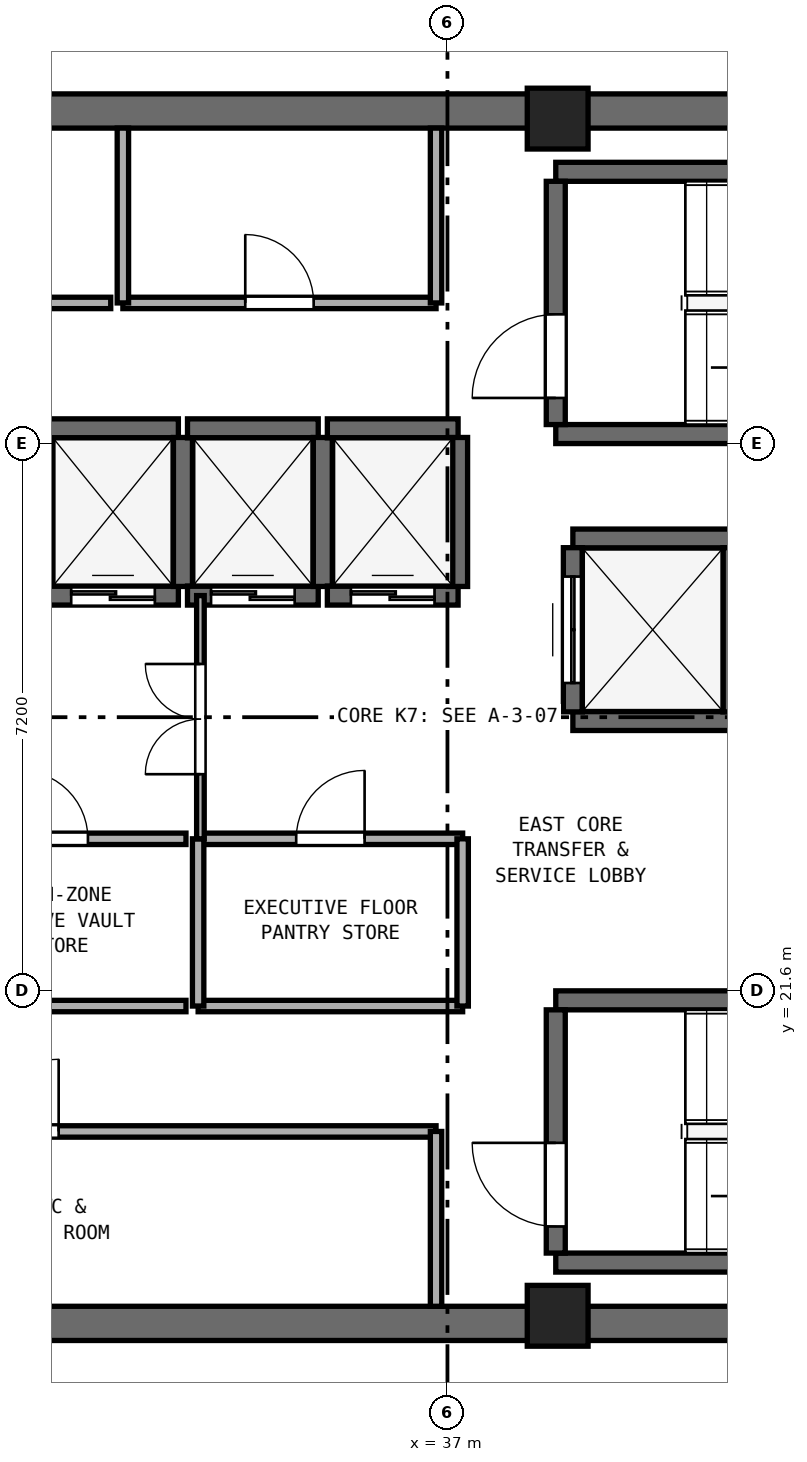
"""IFC4 building model, lengths in metres.
Left out: names, types, materials, properties, quantities, classifications, styles, units other than length and angle.
Written with IfcOpenShell. Run it as: python <this file> out.ifc"""

import sys

from ifc_helpers import new_model, si_unit, direction, frame, frame_2d, origin, origin_2d, place, context, subcontext, project, spatial, rectangle, extrude, element, fill, save


model = new_model("IFC4")
c1 = context("Model", 3, precision=1e-05, world=origin(), true_north=direction((0.0, 1.0)))
c2 = subcontext(c1, "Body", "Model", "MODEL_VIEW")
j1 = project(units=[si_unit("LENGTHUNIT", "METRE"), si_unit("PLANEANGLEUNIT", "RADIAN")], contexts=[c1])
p1 = place(None, origin())
s1 = spatial("IfcSite", under=j1, at=p1, CompositionType="ELEMENT")
p2 = place(p1, origin())
s2 = spatial("IfcBuilding", under=s1, at=p2, CompositionType="ELEMENT")
p3 = place(p2, frame((0.0, 0.0, 266.8)))
s3 = spatial("IfcBuildingStorey", under=s2, at=p3, CompositionType="ELEMENT", Elevation=266.8)
for number, where, z_axis, x_axis in (
    (1, (25.4, 17.225, 0.0), (0.0, 0.0, 1.0), (1.0, 0.0, 0.0)),
    (2, (25.4, 33.175, 0.0), (0.0, 0.0, 1.0), (1.0, 0.0, 0.0)),
):
    element("IfcWall", number, at=place(p3, frame(where, z_axis=z_axis, x_axis=x_axis)), inside=s3, PredefinedType="SHEAR", context=c2, shape_type="SweptSolid", body=[
        extrude(rectangle(XDim=23.2, YDim=0.45, at=frame_2d((11.6, 0.0))), origin(), (0.0, 0.0, 1.0), 3.51),
    ])
for number, where, z_axis, x_axis in (
    (3, (38.45, 17.325, 0.0), (0.0, 0.0, 1.0), (1.0, 0.0, 0.0)),
    (4, (38.45, 33.075, 0.0), (0.0, 0.0, 1.0), (1.0, 0.0, 0.0)),
):
    element("IfcColumn", number, at=place(p3, frame(where, z_axis=z_axis, x_axis=x_axis)), inside=s3, PredefinedType="PILASTER", context=c2, shape_type="SweptSolid", body=[
        extrude(rectangle(XDim=0.8, YDim=0.8, at=origin_2d()), origin(), (0.0, 0.0, 1.0), 3.8),
    ])
for number, where, z_axis, x_axis in (
    (5, (38.425, 28.925, 0.0), (0.0, 0.0, 1.0), (1.0, 0.0, 0.0)),
    (6, (38.425, 32.375, 0.0), (0.0, 0.0, 1.0), (1.0, 0.0, 0.0)),
):
    element("IfcWall", number, at=place(p3, frame(where, z_axis=z_axis, x_axis=x_axis)), inside=s3, PredefinedType="SHEAR", context=c2, shape_type="SweptSolid", body=[
        extrude(rectangle(XDim=7.3, YDim=0.25, at=frame_2d((3.65, 0.0))), origin(), (0.0, 0.0, 1.0), 3.51),
    ])
p4 = place(p3, frame((38.425, 29.05, 0.0), z_axis=(0.0, 0.0, 1.0), x_axis=(0.0, 1.0, 0.0)))
e7 = element("IfcWall", 7, at=p4, inside=s3, PredefinedType="SHEAR", context=c2, shape_type="SweptSolid", body=[
    extrude(rectangle(XDim=3.2, YDim=0.25, at=frame_2d((1.6, 0.0))), origin(), (0.0, 0.0, 1.0), 3.51),
])
p5 = place(p4, frame((0.35, 0.0, 0.0)))
e8 = element("IfcOpeningElement", 8, at=p5, cuts=e7, PredefinedType="OPENING", context=c2, shape_type="SweptSolid", body=[
    extrude(rectangle(XDim=1.1, YDim=2.15, at=frame_2d((0.55, 1.075))), frame((0.0, 0.135, 0.0), z_axis=(0.0, -1.0, 0.0), x_axis=(1.0, 0.0, 0.0)), (0.0, 0.0, 1.0), 0.27),
])
for number, where, z_axis, x_axis in (
    (9, (38.425, 18.025, 0.0), (0.0, 0.0, 1.0), (1.0, 0.0, 0.0)),
    (10, (38.425, 21.475, 0.0), (0.0, 0.0, 1.0), (1.0, 0.0, 0.0)),
):
    element("IfcWall", number, at=place(p3, frame(where, z_axis=z_axis, x_axis=x_axis)), inside=s3, PredefinedType="SHEAR", context=c2, shape_type="SweptSolid", body=[
        extrude(rectangle(XDim=7.3, YDim=0.25, at=frame_2d((3.65, 0.0))), origin(), (0.0, 0.0, 1.0), 3.51),
    ])
p6 = place(p3, frame((38.425, 18.15, 0.0), z_axis=(0.0, 0.0, 1.0), x_axis=(0.0, 1.0, 0.0)))
e11 = element("IfcWall", 11, at=p6, inside=s3, PredefinedType="SHEAR", context=c2, shape_type="SweptSolid", body=[
    extrude(rectangle(XDim=3.2, YDim=0.25, at=frame_2d((1.6, 0.0))), origin(), (0.0, 0.0, 1.0), 3.51),
])
p7 = place(p6, frame((0.35, 0.0, 0.0)))
e12 = element("IfcOpeningElement", 12, at=p7, cuts=e11, PredefinedType="OPENING", context=c2, shape_type="SweptSolid", body=[
    extrude(rectangle(XDim=1.1, YDim=2.15, at=frame_2d((0.55, 1.075))), frame((0.0, 0.135, 0.0), z_axis=(0.0, -1.0, 0.0), x_axis=(1.0, 0.0, 0.0)), (0.0, 0.0, 1.0), 0.27),
])
p8 = place(p3, frame((31.74, 26.8, 0.0), z_axis=(0.0, 0.0, 1.0), x_axis=(1.0, 0.0, 0.0)))
e13 = element("IfcWall", 13, at=p8, inside=s3, PredefinedType="SHEAR", context=c2, shape_type="SweptSolid", body=[
    extrude(rectangle(XDim=1.72, YDim=0.25, at=frame_2d((0.86, 0.0))), origin(), (0.0, 0.0, 1.0), 3.51),
])
p9 = place(p8, frame((0.31, 0.0, 0.0)))
e14 = element("IfcOpeningElement", 14, at=p9, cuts=e13, PredefinedType="OPENING", context=c2, shape_type="SweptSolid", body=[
    extrude(rectangle(XDim=1.1, YDim=2.15, at=frame_2d((0.55, 1.075))), frame((0.0, 0.135, 0.0), z_axis=(0.0, -1.0, 0.0), x_axis=(1.0, 0.0, 0.0)), (0.0, 0.0, 1.0), 0.27),
])
p10 = place(p3, frame((31.74, 29.0, 0.0), z_axis=(0.0, 0.0, 1.0), x_axis=(1.0, 0.0, 0.0)))
e15 = element("IfcWall", 15, at=p10, inside=s3, PredefinedType="SHEAR", context=c2, shape_type="SweptSolid", body=[
    extrude(rectangle(XDim=1.72, YDim=0.25, at=frame_2d((0.86, 0.0))), origin(), (0.0, 0.0, 1.0), 3.51),
])
p11 = place(p3, frame((33.52, 26.92, 0.0), z_axis=(0.0, 0.0, 1.0), x_axis=(0.0, 1.0, 0.0)))
e16 = element("IfcWall", 16, at=p11, inside=s3, PredefinedType="SHEAR", context=c2, shape_type="SweptSolid", body=[
    extrude(rectangle(XDim=1.96, YDim=0.25, at=frame_2d((0.98, 0.0))), origin(), (0.0, 0.0, 1.0), 3.51),
])
p12 = place(p3, frame((33.58, 26.8, 0.0), z_axis=(0.0, 0.0, 1.0), x_axis=(1.0, 0.0, 0.0)))
e17 = element("IfcWall", 17, at=p12, inside=s3, PredefinedType="SHEAR", context=c2, shape_type="SweptSolid", body=[
    extrude(rectangle(XDim=1.72, YDim=0.25, at=frame_2d((0.86, 0.0))), origin(), (0.0, 0.0, 1.0), 3.51),
])
p13 = place(p12, frame((0.31, 0.0, 0.0)))
e18 = element("IfcOpeningElement", 18, at=p13, cuts=e17, PredefinedType="OPENING", context=c2, shape_type="SweptSolid", body=[
    extrude(rectangle(XDim=1.1, YDim=2.15, at=frame_2d((0.55, 1.075))), frame((0.0, 0.135, 0.0), z_axis=(0.0, -1.0, 0.0), x_axis=(1.0, 0.0, 0.0)), (0.0, 0.0, 1.0), 0.27),
])
p14 = place(p3, frame((33.58, 29.0, 0.0), z_axis=(0.0, 0.0, 1.0), x_axis=(1.0, 0.0, 0.0)))
e19 = element("IfcWall", 19, at=p14, inside=s3, PredefinedType="SHEAR", context=c2, shape_type="SweptSolid", body=[
    extrude(rectangle(XDim=1.72, YDim=0.25, at=frame_2d((0.86, 0.0))), origin(), (0.0, 0.0, 1.0), 3.51),
])
p15 = place(p3, frame((35.36, 26.92, 0.0), z_axis=(0.0, 0.0, 1.0), x_axis=(0.0, 1.0, 0.0)))
e20 = element("IfcWall", 20, at=p15, inside=s3, PredefinedType="SHEAR", context=c2, shape_type="SweptSolid", body=[
    extrude(rectangle(XDim=1.96, YDim=0.25, at=frame_2d((0.98, 0.0))), origin(), (0.0, 0.0, 1.0), 3.51),
])
p16 = place(p3, frame((35.42, 26.8, 0.0), z_axis=(0.0, 0.0, 1.0), x_axis=(1.0, 0.0, 0.0)))
e21 = element("IfcWall", 21, at=p16, inside=s3, PredefinedType="SHEAR", context=c2, shape_type="SweptSolid", body=[
    extrude(rectangle(XDim=1.72, YDim=0.25, at=frame_2d((0.86, 0.0))), origin(), (0.0, 0.0, 1.0), 3.51),
])
p17 = place(p16, frame((0.31, 0.0, 0.0)))
e22 = element("IfcOpeningElement", 22, at=p17, cuts=e21, PredefinedType="OPENING", context=c2, shape_type="SweptSolid", body=[
    extrude(rectangle(XDim=1.1, YDim=2.15, at=frame_2d((0.55, 1.075))), frame((0.0, 0.135, 0.0), z_axis=(0.0, -1.0, 0.0), x_axis=(1.0, 0.0, 0.0)), (0.0, 0.0, 1.0), 0.27),
])
p18 = place(p3, frame((35.42, 29.0, 0.0), z_axis=(0.0, 0.0, 1.0), x_axis=(1.0, 0.0, 0.0)))
e23 = element("IfcWall", 23, at=p18, inside=s3, PredefinedType="SHEAR", context=c2, shape_type="SweptSolid", body=[
    extrude(rectangle(XDim=1.72, YDim=0.25, at=frame_2d((0.86, 0.0))), origin(), (0.0, 0.0, 1.0), 3.51),
])
p19 = place(p3, frame((37.14, 26.92, 0.0), z_axis=(0.0, 0.0, 1.0), x_axis=(0.0, 1.0, 0.0)))
e24 = element("IfcWall", 24, at=p19, inside=s3, PredefinedType="SHEAR", context=c2, shape_type="SweptSolid", body=[
    extrude(rectangle(XDim=1.96, YDim=0.25, at=frame_2d((0.98, 0.0))), origin(), (0.0, 0.0, 1.0), 3.51),
])
for number, where, z_axis, x_axis in (
    (25, (38.65, 25.15, 0.0), (0.0, 0.0, 1.0), (1.0, 0.0, 0.0)),
    (26, (38.65, 27.55, 0.0), (0.0, 0.0, 1.0), (1.0, 0.0, 0.0)),
):
    element("IfcWall", number, at=place(p3, frame(where, z_axis=z_axis, x_axis=x_axis)), inside=s3, PredefinedType="SHEAR", context=c2, shape_type="SweptSolid", body=[
        extrude(rectangle(XDim=2.1, YDim=0.25, at=frame_2d((1.05, 0.0))), origin(), (0.0, 0.0, 1.0), 3.51),
    ])
p20 = place(p3, frame((38.65, 25.27, 0.0), z_axis=(0.0, 0.0, 1.0), x_axis=(0.0, 1.0, 0.0)))
e27 = element("IfcWall", 27, at=p20, inside=s3, PredefinedType="SHEAR", context=c2, shape_type="SweptSolid", body=[
    extrude(rectangle(XDim=2.16, YDim=0.25, at=frame_2d((1.08, 0.0))), origin(), (0.0, 0.0, 1.0), 3.51),
])
p21 = place(p20, frame((0.38, 0.0, 0.0)))
e28 = element("IfcOpeningElement", 28, at=p21, cuts=e27, PredefinedType="OPENING", context=c2, shape_type="SweptSolid", body=[
    extrude(rectangle(XDim=1.4, YDim=2.2, at=frame_2d((0.7, 1.1))), frame((0.0, 0.135, 0.0), z_axis=(0.0, -1.0, 0.0), x_axis=(1.0, 0.0, 0.0)), (0.0, 0.0, 1.0), 0.27),
])
p22 = place(p3, frame((40.75, 25.27, 0.0), z_axis=(0.0, 0.0, 1.0), x_axis=(0.0, 1.0, 0.0)))
e29 = element("IfcWall", 29, at=p22, inside=s3, PredefinedType="SHEAR", context=c2, shape_type="SweptSolid", body=[
    extrude(rectangle(XDim=2.16, YDim=0.25, at=frame_2d((1.08, 0.0))), origin(), (0.0, 0.0, 1.0), 3.51),
])
p23 = place(p3, frame((29.33, 30.65, 0.0), z_axis=(0.0, 0.0, 1.0), x_axis=(1.0, 0.0, 0.0)))
e30 = element("IfcWall", 30, at=p23, inside=s3, PredefinedType="PARTITIONING", context=c2, shape_type="SweptSolid", body=[
    extrude(rectangle(XDim=3.24, YDim=0.15, at=frame_2d((1.62, 0.0))), origin(), (0.0, 0.0, 1.0), 3.51),
])
p24 = place(p23, frame((1.145, 0.0, 0.0)))
e31 = element("IfcOpeningElement", 31, at=p24, cuts=e30, PredefinedType="OPENING", context=c2, shape_type="SweptSolid", body=[
    extrude(rectangle(XDim=0.95, YDim=2.1, at=frame_2d((0.475, 1.05))), frame((0.0, 0.085, 0.0), z_axis=(0.0, -1.0, 0.0), x_axis=(1.0, 0.0, 0.0)), (0.0, 0.0, 1.0), 0.17),
])
p25 = place(p3, frame((32.73, 30.65, 0.0), z_axis=(0.0, 0.0, 1.0), x_axis=(1.0, 0.0, 0.0)))
e32 = element("IfcWall", 32, at=p25, inside=s3, PredefinedType="PARTITIONING", context=c2, shape_type="SweptSolid", body=[
    extrude(rectangle(XDim=4.12, YDim=0.15, at=frame_2d((2.06, 0.0))), origin(), (0.0, 0.0, 1.0), 3.51),
])
p26 = place(p25, frame((1.61, 0.0, 0.0)))
e33 = element("IfcOpeningElement", 33, at=p26, cuts=e32, PredefinedType="OPENING", context=c2, shape_type="SweptSolid", body=[
    extrude(rectangle(XDim=0.9, YDim=2.1, at=frame_2d((0.45, 1.05))), frame((0.0, 0.085, 0.0), z_axis=(0.0, -1.0, 0.0), x_axis=(1.0, 0.0, 0.0)), (0.0, 0.0, 1.0), 0.17),
])
for number, where, z_axis, x_axis in (
    (34, (32.73, 30.65, 0.0), (0.0, 0.0, 1.0), (0.0, 1.0, 0.0)),
    (35, (36.85, 30.65, 0.0), (0.0, 0.0, 1.0), (0.0, 1.0, 0.0)),
):
    element("IfcWall", number, at=place(p3, frame(where, z_axis=z_axis, x_axis=x_axis)), inside=s3, PredefinedType="PARTITIONING", context=c2, shape_type="SweptSolid", body=[
        extrude(rectangle(XDim=2.3, YDim=0.15, at=frame_2d((1.15, 0.0))), origin(), (0.0, 0.0, 1.0), 3.51),
    ])
p27 = place(p3, frame((25.97, 19.75, 0.0), z_axis=(0.0, 0.0, 1.0), x_axis=(1.0, 0.0, 0.0)))
e36 = element("IfcWall", 36, at=p27, inside=s3, PredefinedType="PARTITIONING", context=c2, shape_type="SweptSolid", body=[
    extrude(rectangle(XDim=10.88, YDim=0.15, at=frame_2d((5.44, 0.0))), origin(), (0.0, 0.0, 1.0), 3.51),
])
p28 = place(p27, frame((4.965, 0.0, 0.0)))
e37 = element("IfcOpeningElement", 37, at=p28, cuts=e36, PredefinedType="OPENING", context=c2, shape_type="SweptSolid", body=[
    extrude(rectangle(XDim=0.95, YDim=2.1, at=frame_2d((0.475, 1.05))), frame((0.0, 0.085, 0.0), z_axis=(0.0, -1.0, 0.0), x_axis=(1.0, 0.0, 0.0)), (0.0, 0.0, 1.0), 0.17),
])
p29 = place(p3, frame((36.85, 17.45, 0.0), z_axis=(0.0, 0.0, 1.0), x_axis=(0.0, 1.0, 0.0)))
e38 = element("IfcWall", 38, at=p29, inside=s3, PredefinedType="PARTITIONING", context=c2, shape_type="SweptSolid", body=[
    extrude(rectangle(XDim=2.3, YDim=0.15, at=frame_2d((1.15, 0.0))), origin(), (0.0, 0.0, 1.0), 3.51),
])
p30 = place(p3, frame((30.08, 21.4, 0.0), z_axis=(0.0, 0.0, 1.0), x_axis=(1.0, 0.0, 0.0)))
e39 = element("IfcWall", 39, at=p30, inside=s3, PredefinedType="PARTITIONING", context=c2, shape_type="SweptSolid", body=[
    extrude(rectangle(XDim=3.48, YDim=0.15, at=frame_2d((1.74, 0.0))), origin(), (0.0, 0.0, 1.0), 3.51),
])
p31 = place(p3, frame((30.08, 23.6, 0.0), z_axis=(0.0, 0.0, 1.0), x_axis=(1.0, 0.0, 0.0)))
e40 = element("IfcWall", 40, at=p31, inside=s3, PredefinedType="PARTITIONING", context=c2, shape_type="SweptSolid", body=[
    extrude(rectangle(XDim=3.48, YDim=0.15, at=frame_2d((1.74, 0.0))), origin(), (0.0, 0.0, 1.0), 3.51),
])
p32 = place(p31, frame((1.29, 0.0, 0.0)))
e41 = element("IfcOpeningElement", 41, at=p32, cuts=e40, PredefinedType="OPENING", context=c2, shape_type="SweptSolid", body=[
    extrude(rectangle(XDim=0.9, YDim=2.1, at=frame_2d((0.45, 1.05))), frame((0.0, 0.085, 0.0), z_axis=(0.0, -1.0, 0.0), x_axis=(1.0, 0.0, 0.0)), (0.0, 0.0, 1.0), 0.17),
])
p33 = place(p3, frame((33.72, 21.4, 0.0), z_axis=(0.0, 0.0, 1.0), x_axis=(1.0, 0.0, 0.0)))
e42 = element("IfcWall", 42, at=p33, inside=s3, PredefinedType="PARTITIONING", context=c2, shape_type="SweptSolid", body=[
    extrude(rectangle(XDim=3.48, YDim=0.15, at=frame_2d((1.74, 0.0))), origin(), (0.0, 0.0, 1.0), 3.51),
])
p34 = place(p3, frame((33.72, 23.6, 0.0), z_axis=(0.0, 0.0, 1.0), x_axis=(1.0, 0.0, 0.0)))
e43 = element("IfcWall", 43, at=p34, inside=s3, PredefinedType="PARTITIONING", context=c2, shape_type="SweptSolid", body=[
    extrude(rectangle(XDim=3.48, YDim=0.15, at=frame_2d((1.74, 0.0))), origin(), (0.0, 0.0, 1.0), 3.51),
])
p35 = place(p34, frame((1.29, 0.0, 0.0)))
e44 = element("IfcOpeningElement", 44, at=p35, cuts=e43, PredefinedType="OPENING", context=c2, shape_type="SweptSolid", body=[
    extrude(rectangle(XDim=0.9, YDim=2.1, at=frame_2d((0.45, 1.05))), frame((0.0, 0.085, 0.0), z_axis=(0.0, -1.0, 0.0), x_axis=(1.0, 0.0, 0.0)), (0.0, 0.0, 1.0), 0.17),
])
for number, where, z_axis, x_axis in (
    (45, (33.72, 21.4, 0.0), (0.0, 0.0, 1.0), (0.0, 1.0, 0.0)),
    (46, (37.2, 21.4, 0.0), (0.0, 0.0, 1.0), (0.0, 1.0, 0.0)),
):
    element("IfcWall", number, at=place(p3, frame(where, z_axis=z_axis, x_axis=x_axis)), inside=s3, PredefinedType="PARTITIONING", context=c2, shape_type="SweptSolid", body=[
        extrude(rectangle(XDim=2.2, YDim=0.15, at=frame_2d((1.1, 0.0))), origin(), (0.0, 0.0, 1.0), 3.51),
    ])
p36 = place(p3, frame((33.75, 23.6, 0.0), z_axis=(0.0, 0.0, 1.0), x_axis=(0.0, 1.0, 0.0)))
e47 = element("IfcWall", 47, at=p36, inside=s3, PredefinedType="PARTITIONING", context=c2, shape_type="SweptSolid", body=[
    extrude(rectangle(XDim=3.2, YDim=0.1, at=frame_2d((1.6, 0.0))), origin(), (0.0, 0.0, 1.0), 3.51),
])
p37 = place(p36, frame((0.85, 0.0, 0.0)))
e48 = element("IfcOpeningElement", 48, at=p37, cuts=e47, PredefinedType="OPENING", context=c2, shape_type="SweptSolid", body=[
    extrude(rectangle(XDim=1.45, YDim=2.12, at=frame_2d((0.725, 1.06))), frame((0.0, 0.06, 0.0), z_axis=(0.0, -1.0, 0.0), x_axis=(1.0, 0.0, 0.0)), (0.0, 0.0, 1.0), 0.12),
])
p38 = place(p5, origin())
e49 = element("IfcDoor", 49, at=p38, inside=s3, OperationType="SINGLE_SWING_LEFT", PredefinedType="DOOR", context=c2, shape_type="SweptSolid", body=[
    extrude(rectangle(XDim=1.1, YDim=2.15, at=frame_2d((0.55, 1.075))), frame((0.0, 0.025, 0.0), z_axis=(0.0, -1.0, 0.0), x_axis=(1.0, 0.0, 0.0)), (0.0, 0.0, 1.0), 0.05),
])
fill(e8, e49)
p39 = place(p7, origin())
e50 = element("IfcDoor", 50, at=p39, inside=s3, OperationType="SINGLE_SWING_RIGHT", PredefinedType="DOOR", context=c2, shape_type="SweptSolid", body=[
    extrude(rectangle(XDim=1.1, YDim=2.15, at=frame_2d((0.55, 1.075))), frame((0.0, 0.025, 0.0), z_axis=(0.0, -1.0, 0.0), x_axis=(1.0, 0.0, 0.0)), (0.0, 0.0, 1.0), 0.05),
])
fill(e12, e50)
p40 = place(p9, origin())
e51 = element("IfcDoor", 51, at=p40, inside=s3, OperationType="DOUBLE_DOOR_SLIDING", PredefinedType="DOOR", context=c2, shape_type="SweptSolid", body=[
    extrude(rectangle(XDim=1.1, YDim=2.15, at=frame_2d((0.55, 1.075))), frame((0.0, 0.025, 0.0), z_axis=(0.0, -1.0, 0.0), x_axis=(1.0, 0.0, 0.0)), (0.0, 0.0, 1.0), 0.05),
])
fill(e14, e51)
p41 = place(p13, origin())
e52 = element("IfcDoor", 52, at=p41, inside=s3, OperationType="DOUBLE_DOOR_SLIDING", PredefinedType="DOOR", context=c2, shape_type="SweptSolid", body=[
    extrude(rectangle(XDim=1.1, YDim=2.15, at=frame_2d((0.55, 1.075))), frame((0.0, 0.025, 0.0), z_axis=(0.0, -1.0, 0.0), x_axis=(1.0, 0.0, 0.0)), (0.0, 0.0, 1.0), 0.05),
])
fill(e18, e52)
p42 = place(p17, origin())
e53 = element("IfcDoor", 53, at=p42, inside=s3, OperationType="DOUBLE_DOOR_SLIDING", PredefinedType="DOOR", context=c2, shape_type="SweptSolid", body=[
    extrude(rectangle(XDim=1.1, YDim=2.15, at=frame_2d((0.55, 1.075))), frame((0.0, 0.025, 0.0), z_axis=(0.0, -1.0, 0.0), x_axis=(1.0, 0.0, 0.0)), (0.0, 0.0, 1.0), 0.05),
])
fill(e22, e53)
p43 = place(p21, origin())
e54 = element("IfcDoor", 54, at=p43, inside=s3, OperationType="DOUBLE_DOOR_SLIDING", PredefinedType="DOOR", context=c2, shape_type="SweptSolid", body=[
    extrude(rectangle(XDim=1.4, YDim=2.2, at=frame_2d((0.7, 1.1))), frame((0.0, 0.025, 0.0), z_axis=(0.0, -1.0, 0.0), x_axis=(1.0, 0.0, 0.0)), (0.0, 0.0, 1.0), 0.05),
])
fill(e28, e54)
p44 = place(p26, origin())
e55 = element("IfcDoor", 55, at=p44, inside=s3, OperationType="SINGLE_SWING_LEFT", PredefinedType="DOOR", context=c2, shape_type="SweptSolid", body=[
    extrude(rectangle(XDim=0.9, YDim=2.1, at=frame_2d((0.45, 1.05))), frame((0.0, 0.025, 0.0), z_axis=(0.0, -1.0, 0.0), x_axis=(1.0, 0.0, 0.0)), (0.0, 0.0, 1.0), 0.05),
])
fill(e33, e55)
p45 = place(p28, origin())
e56 = element("IfcDoor", 56, at=p45, inside=s3, OperationType="SINGLE_SWING_RIGHT", PredefinedType="DOOR", context=c2, shape_type="SweptSolid", body=[
    extrude(rectangle(XDim=0.95, YDim=2.1, at=frame_2d((0.475, 1.05))), frame((0.0, 0.025, 0.0), z_axis=(0.0, -1.0, 0.0), x_axis=(1.0, 0.0, 0.0)), (0.0, 0.0, 1.0), 0.05),
])
fill(e37, e56)
p46 = place(p32, origin())
e57 = element("IfcDoor", 57, at=p46, inside=s3, OperationType="SINGLE_SWING_LEFT", PredefinedType="DOOR", context=c2, shape_type="SweptSolid", body=[
    extrude(rectangle(XDim=0.9, YDim=2.1, at=frame_2d((0.45, 1.05))), frame((0.0, 0.025, 0.0), z_axis=(0.0, -1.0, 0.0), x_axis=(1.0, 0.0, 0.0)), (0.0, 0.0, 1.0), 0.05),
])
fill(e41, e57)
p47 = place(p35, origin())
e58 = element("IfcDoor", 58, at=p47, inside=s3, OperationType="SINGLE_SWING_RIGHT", PredefinedType="DOOR", context=c2, shape_type="SweptSolid", body=[
    extrude(rectangle(XDim=0.9, YDim=2.1, at=frame_2d((0.45, 1.05))), frame((0.0, 0.025, 0.0), z_axis=(0.0, -1.0, 0.0), x_axis=(1.0, 0.0, 0.0)), (0.0, 0.0, 1.0), 0.05),
])
fill(e44, e58)
p48 = place(p37, origin())
e59 = element("IfcDoor", 59, at=p48, inside=s3, OperationType="DOUBLE_DOOR_SINGLE_SWING", PredefinedType="DOOR", context=c2, shape_type="SweptSolid", body=[
    extrude(rectangle(XDim=1.45, YDim=2.12, at=frame_2d((0.725, 1.06))), frame((0.0, 0.025, 0.0), z_axis=(0.0, -1.0, 0.0), x_axis=(1.0, 0.0, 0.0)), (0.0, 0.0, 1.0), 0.05),
])
fill(e48, e59)
save(model, sys.argv[1])
